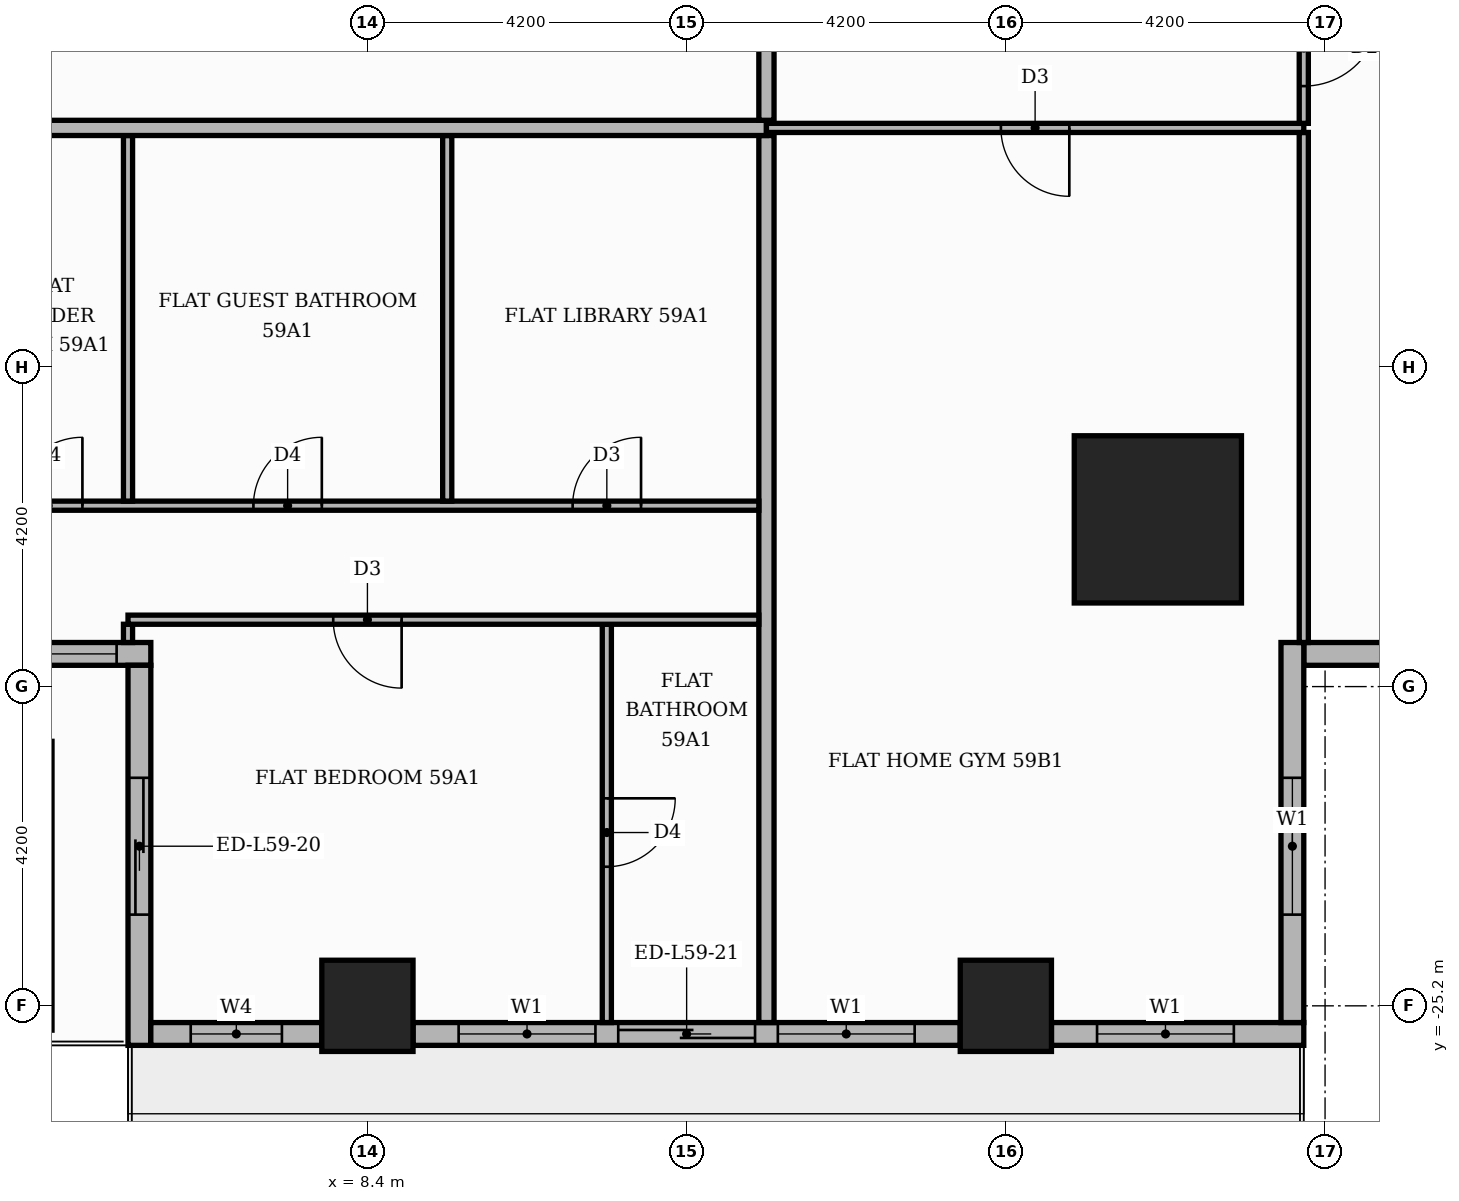
"""IFC4 building model, lengths in metres.
Left out: names, types, materials, properties, quantities, classifications, styles, units other than length and angle.
Written with IfcOpenShell. Run it as: python <this file> out.ifc"""

import sys

from ifc_helpers import new_model, si_unit, direction, frame, frame_2d, origin, origin_2d, place, context, subcontext, project, spatial, rectangle, extrude, element, fill, save


model = new_model("IFC4")
c1 = context("Model", 3, precision=1e-05, world=origin(), true_north=direction((0.0, 1.0)))
c2 = subcontext(c1, "Body", "Model", "MODEL_VIEW")
j1 = project(units=[si_unit("LENGTHUNIT", "METRE"), si_unit("PLANEANGLEUNIT", "RADIAN")], contexts=[c1])
p1 = place(None, origin())
s1 = spatial("IfcSite", under=j1, at=p1, CompositionType="ELEMENT")
p2 = place(p1, origin())
s2 = spatial("IfcBuilding", under=s1, at=p2, CompositionType="ELEMENT")
p3 = place(p2, frame((0.0, 0.0, 248.4)))
s3 = spatial("IfcBuildingStorey", under=s2, at=p3, CompositionType="ELEMENT", Elevation=248.4)
p4 = place(p3, frame((18.8, -18.8, 0.0), z_axis=(0.0, 0.0, 1.0), x_axis=(1.0, 0.0, 0.0)))
e1 = element("IfcColumn", 1, at=p4, inside=s3, PredefinedType="COLUMN", context=c2, shape_type="SweptSolid", body=[
    extrude(rectangle(XDim=2.2, YDim=2.2, at=origin_2d()), origin(), (0.0, 0.0, 1.0), 3.9),
])
for number, where, z_axis, x_axis in (
    (2, (8.4, -25.2, 0.0), (0.0, 0.0, 1.0), (1.0, 0.0, 0.0)),
    (3, (16.8, -25.2, 0.0), (0.0, 0.0, 1.0), (1.0, 0.0, 0.0)),
):
    element("IfcColumn", number, at=place(p3, frame(where, z_axis=z_axis, x_axis=x_axis)), inside=s3, PredefinedType="COLUMN", context=c2, shape_type="SweptSolid", body=[
        extrude(rectangle(XDim=1.2, YDim=1.2, at=origin_2d()), origin(), (0.0, 0.0, 1.0), 3.9),
    ])
p5 = place(p3, frame((20.72, -20.57, 0.0), z_axis=(0.0, 0.0, 1.0), x_axis=(1.0, 0.0, 0.0)))
e4 = element("IfcWall", 4, at=p5, inside=s3, PredefinedType="STANDARD", context=c2, shape_type="SweptSolid", body=[
    extrude(rectangle(XDim=5.0, YDim=0.3, at=frame_2d((2.5, 0.0))), origin(), (0.0, 0.0, 1.0), 3.48),
])
p6 = place(p5, frame((1.48, 0.0, 0.9)))
e5 = element("IfcOpeningElement", 5, at=p6, cuts=e4, PredefinedType="OPENING", context=c2, shape_type="SweptSolid", body=[
    extrude(rectangle(XDim=1.8, YDim=2.1, at=frame_2d((0.9, 1.05))), frame((0.0, 0.16, 0.0), z_axis=(0.0, -1.0, 0.0), x_axis=(1.0, 0.0, 0.0)), (0.0, 0.0, 1.0), 0.32),
])
p7 = place(p3, frame((-5.25, -20.57, 0.0), z_axis=(0.0, 0.0, 1.0), x_axis=(1.0, 0.0, 0.0)))
e6 = element("IfcWall", 6, at=p7, inside=s3, PredefinedType="STANDARD", context=c2, shape_type="SweptSolid", body=[
    extrude(rectangle(XDim=10.8, YDim=0.3, at=frame_2d((5.4, 0.0))), origin(), (0.0, 0.0, 1.0), 3.48),
])
p8 = place(p7, frame((0.15, 0.0, 0.9)))
e7 = element("IfcOpeningElement", 7, at=p8, cuts=e6, PredefinedType="OPENING", context=c2, shape_type="SweptSolid", body=[
    extrude(rectangle(XDim=6.0, YDim=2.1, at=frame_2d((3.0, 1.05))), frame((0.0, 0.16, 0.0), z_axis=(0.0, -1.0, 0.0), x_axis=(1.0, 0.0, 0.0)), (0.0, 0.0, 1.0), 0.32),
])
p9 = place(p7, frame((6.45, 0.0, 0.9)))
e8 = element("IfcOpeningElement", 8, at=p9, cuts=e6, PredefinedType="OPENING", context=c2, shape_type="SweptSolid", body=[
    extrude(rectangle(XDim=3.9, YDim=2.1, at=frame_2d((1.95, 1.05))), frame((0.0, 0.16, 0.0), z_axis=(0.0, -1.0, 0.0), x_axis=(1.0, 0.0, 0.0)), (0.0, 0.0, 1.0), 0.32),
])
p10 = place(p3, frame((5.4, -20.72, 0.0), z_axis=(0.0, 0.0, 1.0), x_axis=(0.0, -1.0, 0.0)))
e9 = element("IfcWall", 9, at=p10, inside=s3, PredefinedType="STANDARD", context=c2, shape_type="SweptSolid", body=[
    extrude(rectangle(XDim=5.0, YDim=0.3, at=frame_2d((2.5, 0.0))), origin(), (0.0, 0.0, 1.0), 3.48),
])
p11 = place(p10, frame((1.48, 0.0, 0.0)))
e10 = element("IfcOpeningElement", 10, at=p11, cuts=e9, PredefinedType="OPENING", context=c2, shape_type="SweptSolid", body=[
    extrude(rectangle(XDim=1.8, YDim=2.4, at=frame_2d((0.9, 1.2))), frame((0.0, 0.16, 0.0), z_axis=(0.0, -1.0, 0.0), x_axis=(1.0, 0.0, 0.0)), (0.0, 0.0, 1.0), 0.32),
])
p12 = place(p3, frame((5.55, -25.57, 0.0), z_axis=(0.0, 0.0, 1.0), x_axis=(1.0, 0.0, 0.0)))
e11 = element("IfcWall", 11, at=p12, inside=s3, PredefinedType="STANDARD", context=c2, shape_type="SweptSolid", body=[
    extrude(rectangle(XDim=2.25, YDim=0.3, at=frame_2d((1.125, 0.0))), origin(), (0.0, 0.0, 1.0), 3.48),
])
p13 = place(p12, frame((0.525, 0.0, 0.9)))
e12 = element("IfcOpeningElement", 12, at=p13, cuts=e11, PredefinedType="OPENING", context=c2, shape_type="SweptSolid", body=[
    extrude(rectangle(XDim=1.2, YDim=2.1, at=frame_2d((0.6, 1.05))), frame((0.0, 0.16, 0.0), z_axis=(0.0, -1.0, 0.0), x_axis=(1.0, 0.0, 0.0)), (0.0, 0.0, 1.0), 0.32),
])
p14 = place(p3, frame((9.0, -25.57, 0.0), z_axis=(0.0, 0.0, 1.0), x_axis=(1.0, 0.0, 0.0)))
e13 = element("IfcWall", 13, at=p14, inside=s3, PredefinedType="STANDARD", context=c2, shape_type="SweptSolid", body=[
    extrude(rectangle(XDim=7.2, YDim=0.3, at=frame_2d((3.6, 0.0))), origin(), (0.0, 0.0, 1.0), 3.48),
])
p15 = place(p14, frame((0.6, 0.0, 0.9)))
e14 = element("IfcOpeningElement", 14, at=p15, cuts=e13, PredefinedType="OPENING", context=c2, shape_type="SweptSolid", body=[
    extrude(rectangle(XDim=1.8, YDim=2.1, at=frame_2d((0.9, 1.05))), frame((0.0, 0.16, 0.0), z_axis=(0.0, -1.0, 0.0), x_axis=(1.0, 0.0, 0.0)), (0.0, 0.0, 1.0), 0.32),
])
p16 = place(p14, frame((2.7, 0.0, 0.0)))
e15 = element("IfcOpeningElement", 15, at=p16, cuts=e13, PredefinedType="OPENING", context=c2, shape_type="SweptSolid", body=[
    extrude(rectangle(XDim=1.8, YDim=2.4, at=frame_2d((0.9, 1.2))), frame((0.0, 0.16, 0.0), z_axis=(0.0, -1.0, 0.0), x_axis=(1.0, 0.0, 0.0)), (0.0, 0.0, 1.0), 0.32),
])
p17 = place(p14, frame((4.8, 0.0, 0.9)))
e16 = element("IfcOpeningElement", 16, at=p17, cuts=e13, PredefinedType="OPENING", context=c2, shape_type="SweptSolid", body=[
    extrude(rectangle(XDim=1.8, YDim=2.1, at=frame_2d((0.9, 1.05))), frame((0.0, 0.16, 0.0), z_axis=(0.0, -1.0, 0.0), x_axis=(1.0, 0.0, 0.0)), (0.0, 0.0, 1.0), 0.32),
])
p18 = place(p3, frame((17.4, -25.57, 0.0), z_axis=(0.0, 0.0, 1.0), x_axis=(1.0, 0.0, 0.0)))
e17 = element("IfcWall", 17, at=p18, inside=s3, PredefinedType="STANDARD", context=c2, shape_type="SweptSolid", body=[
    extrude(rectangle(XDim=3.32, YDim=0.3, at=frame_2d((1.66, 0.0))), origin(), (0.0, 0.0, 1.0), 3.48),
])
p19 = place(p18, frame((0.6, 0.0, 0.9)))
e18 = element("IfcOpeningElement", 18, at=p19, cuts=e17, PredefinedType="OPENING", context=c2, shape_type="SweptSolid", body=[
    extrude(rectangle(XDim=1.8, YDim=2.1, at=frame_2d((0.9, 1.05))), frame((0.0, 0.16, 0.0), z_axis=(0.0, -1.0, 0.0), x_axis=(1.0, 0.0, 0.0)), (0.0, 0.0, 1.0), 0.32),
])
p20 = place(p3, frame((20.57, -25.42, 0.0), z_axis=(0.0, 0.0, 1.0), x_axis=(0.0, 1.0, 0.0)))
e19 = element("IfcWall", 19, at=p20, inside=s3, PredefinedType="STANDARD", context=c2, shape_type="SweptSolid", body=[
    extrude(rectangle(XDim=5.0, YDim=0.3, at=frame_2d((2.5, 0.0))), origin(), (0.0, 0.0, 1.0), 3.48),
])
p21 = place(p20, frame((1.42, 0.0, 0.9)))
e20 = element("IfcOpeningElement", 20, at=p21, cuts=e19, PredefinedType="OPENING", context=c2, shape_type="SweptSolid", body=[
    extrude(rectangle(XDim=1.8, YDim=2.1, at=frame_2d((0.9, 1.05))), frame((0.0, 0.16, 0.0), z_axis=(0.0, -1.0, 0.0), x_axis=(1.0, 0.0, 0.0)), (0.0, 0.0, 1.0), 0.32),
])
p22 = place(p3, frame((11.55, -25.42, 0.0), z_axis=(0.0, 0.0, 1.0), x_axis=(0.0, 1.0, 0.0)))
e21 = element("IfcWall", 21, at=p22, inside=s3, PredefinedType="PARTITIONING", context=c2, shape_type="SweptSolid", body=[
    extrude(rectangle(XDim=5.24, YDim=0.12, at=frame_2d((2.62, 0.0))), origin(), (0.0, 0.0, 1.0), 3.48),
])
p23 = place(p22, frame((2.05, 0.0, 0.0)))
e22 = element("IfcOpeningElement", 22, at=p23, cuts=e21, PredefinedType="OPENING", context=c2, shape_type="SweptSolid", body=[
    extrude(rectangle(XDim=0.9, YDim=2.1, at=frame_2d((0.45, 1.05))), frame((0.0, 0.07, 0.0), z_axis=(0.0, -1.0, 0.0), x_axis=(1.0, 0.0, 0.0)), (0.0, 0.0, 1.0), 0.14),
])
p24 = place(p3, frame((13.65, -25.42, 0.0), z_axis=(0.0, 0.0, 1.0), x_axis=(0.0, 1.0, 0.0)))
e23 = element("IfcWall", 23, at=p24, inside=s3, PredefinedType="PARTITIONING", context=c2, shape_type="SweptSolid", body=[
    extrude(rectangle(XDim=11.67, YDim=0.2, at=frame_2d((5.835, 0.0))), origin(), (0.0, 0.0, 1.0), 3.48),
])
p25 = place(p3, frame((5.25, -20.42, 0.0), z_axis=(0.0, 0.0, 1.0), x_axis=(0.0, 1.0, 0.0)))
e24 = element("IfcWall", 24, at=p25, inside=s3, PredefinedType="PARTITIONING", context=c2, shape_type="SweptSolid", body=[
    extrude(rectangle(XDim=0.24, YDim=0.12, at=frame_2d((0.12, 0.0))), origin(), (0.0, 0.0, 1.0), 3.48),
])
p26 = place(p3, frame((20.72, -20.42, 0.0), z_axis=(0.0, 0.0, 1.0), x_axis=(0.0, 1.0, 0.0)))
e25 = element("IfcWall", 25, at=p26, inside=s3, PredefinedType="PARTITIONING", context=c2, shape_type="SweptSolid", body=[
    extrude(rectangle(XDim=6.71, YDim=0.12, at=frame_2d((3.355, 0.0))), origin(), (0.0, 0.0, 1.0), 3.48),
])
p27 = place(p3, frame((5.25, -20.12, 0.0), z_axis=(0.0, 0.0, 1.0), x_axis=(1.0, 0.0, 0.0)))
e26 = element("IfcWall", 26, at=p27, inside=s3, PredefinedType="PARTITIONING", context=c2, shape_type="SweptSolid", body=[
    extrude(rectangle(XDim=8.3, YDim=0.12, at=frame_2d((4.15, 0.0))), origin(), (0.0, 0.0, 1.0), 3.48),
])
p28 = place(p27, frame((2.7, 0.0, 0.0)))
e27 = element("IfcOpeningElement", 27, at=p28, cuts=e26, PredefinedType="OPENING", context=c2, shape_type="SweptSolid", body=[
    extrude(rectangle(XDim=0.9, YDim=2.1, at=frame_2d((0.45, 1.05))), frame((0.0, 0.07, 0.0), z_axis=(0.0, -1.0, 0.0), x_axis=(1.0, 0.0, 0.0)), (0.0, 0.0, 1.0), 0.14),
])
p29 = place(p3, frame((-9.45, -18.62, 0.0), z_axis=(0.0, 0.0, 1.0), x_axis=(1.0, 0.0, 0.0)))
e28 = element("IfcWall", 28, at=p29, inside=s3, PredefinedType="PARTITIONING", context=c2, shape_type="SweptSolid", body=[
    extrude(rectangle(XDim=23.0, YDim=0.12, at=frame_2d((11.5, 0.0))), origin(), (0.0, 0.0, 1.0), 3.48),
])
p30 = place(p29, frame((2.7, 0.0, 0.0)))
e29 = element("IfcOpeningElement", 29, at=p30, cuts=e28, PredefinedType="OPENING", context=c2, shape_type="SweptSolid", body=[
    extrude(rectangle(XDim=0.9, YDim=2.1, at=frame_2d((0.45, 1.05))), frame((0.0, 0.07, 0.0), z_axis=(0.0, -1.0, 0.0), x_axis=(1.0, 0.0, 0.0)), (0.0, 0.0, 1.0), 0.14),
])
p31 = place(p29, frame((9.0, 0.0, 0.0)))
e30 = element("IfcOpeningElement", 30, at=p31, cuts=e28, PredefinedType="OPENING", context=c2, shape_type="SweptSolid", body=[
    extrude(rectangle(XDim=0.9, YDim=2.1, at=frame_2d((0.45, 1.05))), frame((0.0, 0.07, 0.0), z_axis=(0.0, -1.0, 0.0), x_axis=(1.0, 0.0, 0.0)), (0.0, 0.0, 1.0), 0.14),
])
p32 = place(p29, frame((13.2, 0.0, 0.0)))
e31 = element("IfcOpeningElement", 31, at=p32, cuts=e28, PredefinedType="OPENING", context=c2, shape_type="SweptSolid", body=[
    extrude(rectangle(XDim=0.9, YDim=2.1, at=frame_2d((0.45, 1.05))), frame((0.0, 0.07, 0.0), z_axis=(0.0, -1.0, 0.0), x_axis=(1.0, 0.0, 0.0)), (0.0, 0.0, 1.0), 0.14),
])
p33 = place(p29, frame((16.35, 0.0, 0.0)))
e32 = element("IfcOpeningElement", 32, at=p33, cuts=e28, PredefinedType="OPENING", context=c2, shape_type="SweptSolid", body=[
    extrude(rectangle(XDim=0.9, YDim=2.1, at=frame_2d((0.45, 1.05))), frame((0.0, 0.07, 0.0), z_axis=(0.0, -1.0, 0.0), x_axis=(1.0, 0.0, 0.0)), (0.0, 0.0, 1.0), 0.14),
])
p34 = place(p29, frame((20.55, 0.0, 0.0)))
e33 = element("IfcOpeningElement", 33, at=p34, cuts=e28, PredefinedType="OPENING", context=c2, shape_type="SweptSolid", body=[
    extrude(rectangle(XDim=0.9, YDim=2.1, at=frame_2d((0.45, 1.05))), frame((0.0, 0.07, 0.0), z_axis=(0.0, -1.0, 0.0), x_axis=(1.0, 0.0, 0.0)), (0.0, 0.0, 1.0), 0.14),
])
for number, where, z_axis, x_axis in (
    (34, (5.25, -18.56, 0.0), (0.0, 0.0, 1.0), (0.0, 1.0, 0.0)),
    (35, (9.45, -18.56, 0.0), (0.0, 0.0, 1.0), (0.0, 1.0, 0.0)),
):
    element("IfcWall", number, at=place(p3, frame(where, z_axis=z_axis, x_axis=x_axis)), inside=s3, PredefinedType="PARTITIONING", context=c2, shape_type="SweptSolid", body=[
        extrude(rectangle(XDim=4.81, YDim=0.12, at=frame_2d((2.405, 0.0))), origin(), (0.0, 0.0, 1.0), 3.48),
    ])
p35 = place(p3, frame((-25.42, -13.65, 0.0), z_axis=(0.0, 0.0, 1.0), x_axis=(1.0, 0.0, 0.0)))
e36 = element("IfcWall", 36, at=p35, inside=s3, PredefinedType="PARTITIONING", context=c2, shape_type="SweptSolid", body=[
    extrude(rectangle(XDim=39.07, YDim=0.2, at=frame_2d((19.535, 0.0))), origin(), (0.0, 0.0, 1.0), 3.48),
])
p36 = place(p35, frame((13.32, 0.0, 0.0)))
e37 = element("IfcOpeningElement", 37, at=p36, cuts=e36, PredefinedType="OPENING", context=c2, shape_type="SweptSolid", body=[
    extrude(rectangle(XDim=1.1, YDim=2.4, at=frame_2d((0.55, 1.2))), frame((0.0, 0.11, 0.0), z_axis=(0.0, -1.0, 0.0), x_axis=(1.0, 0.0, 0.0)), (0.0, 0.0, 1.0), 0.22),
])
p37 = place(p3, frame((13.65, -13.65, 0.0), z_axis=(0.0, 0.0, 1.0), x_axis=(1.0, 0.0, 0.0)))
e38 = element("IfcWall", 38, at=p37, inside=s3, PredefinedType="PARTITIONING", context=c2, shape_type="SweptSolid", body=[
    extrude(rectangle(XDim=7.07, YDim=0.12, at=frame_2d((3.535, 0.0))), origin(), (0.0, 0.0, 1.0), 3.48),
])
p38 = place(p37, frame((3.085, 0.0, 0.0)))
e39 = element("IfcOpeningElement", 39, at=p38, cuts=e38, PredefinedType="OPENING", context=c2, shape_type="SweptSolid", body=[
    extrude(rectangle(XDim=0.9, YDim=2.1, at=frame_2d((0.45, 1.05))), frame((0.0, 0.07, 0.0), z_axis=(0.0, -1.0, 0.0), x_axis=(1.0, 0.0, 0.0)), (0.0, 0.0, 1.0), 0.14),
])
p39 = place(p3, frame((20.72, -13.59, 0.0), z_axis=(0.0, 0.0, 1.0), x_axis=(0.0, 1.0, 0.0)))
e40 = element("IfcWall", 40, at=p39, inside=s3, PredefinedType="PARTITIONING", context=c2, shape_type="SweptSolid", body=[
    extrude(rectangle(XDim=1.98, YDim=0.12, at=frame_2d((0.99, 0.0))), origin(), (0.0, 0.0, 1.0), 3.48),
])
p40 = place(p39, frame((0.49, 0.0, 0.0)))
e41 = element("IfcOpeningElement", 41, at=p40, cuts=e40, PredefinedType="OPENING", context=c2, shape_type="SweptSolid", body=[
    extrude(rectangle(XDim=1.0, YDim=2.1, at=frame_2d((0.5, 1.05))), frame((0.0, 0.07, 0.0), z_axis=(0.0, -1.0, 0.0), x_axis=(1.0, 0.0, 0.0)), (0.0, 0.0, 1.0), 0.14),
])
p41 = place(p3, frame((13.65, -13.55, 0.0), z_axis=(0.0, 0.0, 1.0), x_axis=(0.0, 1.0, 0.0)))
e42 = element("IfcWall", 42, at=p41, inside=s3, PredefinedType="PARTITIONING", context=c2, shape_type="SweptSolid", body=[
    extrude(rectangle(XDim=2.45, YDim=0.2, at=frame_2d((1.225, 0.0))), origin(), (0.0, 0.0, 1.0), 3.48),
])
p42 = place(p9, origin())
e43 = element("IfcWindow", 43, at=p42, inside=s3, PartitioningType="SINGLE_PANEL", PredefinedType="WINDOW", context=c2, shape_type="SweptSolid", body=[
    extrude(rectangle(XDim=3.9, YDim=2.1, at=frame_2d((1.95, 1.05))), frame((0.0, 0.03, 0.0), z_axis=(0.0, -1.0, 0.0), x_axis=(1.0, 0.0, 0.0)), (0.0, 0.0, 1.0), 0.06),
])
fill(e8, e43)
p43 = place(p11, origin())
e44 = element("IfcDoor", 44, at=p43, inside=s3, OperationType="SLIDING_TO_RIGHT", PredefinedType="DOOR", context=c2, shape_type="SweptSolid", body=[
    extrude(rectangle(XDim=1.8, YDim=2.4, at=frame_2d((0.9, 1.2))), frame((0.0, 0.025, 0.0), z_axis=(0.0, -1.0, 0.0), x_axis=(1.0, 0.0, 0.0)), (0.0, 0.0, 1.0), 0.05),
])
fill(e10, e44)
p44 = place(p13, origin())
e45 = element("IfcWindow", 45, at=p44, inside=s3, PartitioningType="SINGLE_PANEL", PredefinedType="WINDOW", context=c2, shape_type="SweptSolid", body=[
    extrude(rectangle(XDim=1.2, YDim=2.1, at=frame_2d((0.6, 1.05))), frame((0.0, 0.03, 0.0), z_axis=(0.0, -1.0, 0.0), x_axis=(1.0, 0.0, 0.0)), (0.0, 0.0, 1.0), 0.06),
])
fill(e12, e45)
p45 = place(p15, origin())
e46 = element("IfcWindow", 46, at=p45, inside=s3, PartitioningType="SINGLE_PANEL", PredefinedType="WINDOW", context=c2, shape_type="SweptSolid", body=[
    extrude(rectangle(XDim=1.8, YDim=2.1, at=frame_2d((0.9, 1.05))), frame((0.0, 0.03, 0.0), z_axis=(0.0, -1.0, 0.0), x_axis=(1.0, 0.0, 0.0)), (0.0, 0.0, 1.0), 0.06),
])
fill(e14, e46)
p46 = place(p16, origin())
e47 = element("IfcDoor", 47, at=p46, inside=s3, OperationType="SLIDING_TO_RIGHT", PredefinedType="DOOR", context=c2, shape_type="SweptSolid", body=[
    extrude(rectangle(XDim=1.8, YDim=2.4, at=frame_2d((0.9, 1.2))), frame((0.0, 0.025, 0.0), z_axis=(0.0, -1.0, 0.0), x_axis=(1.0, 0.0, 0.0)), (0.0, 0.0, 1.0), 0.05),
])
fill(e15, e47)
p47 = place(p17, origin())
e48 = element("IfcWindow", 48, at=p47, inside=s3, PartitioningType="SINGLE_PANEL", PredefinedType="WINDOW", context=c2, shape_type="SweptSolid", body=[
    extrude(rectangle(XDim=1.8, YDim=2.1, at=frame_2d((0.9, 1.05))), frame((0.0, 0.03, 0.0), z_axis=(0.0, -1.0, 0.0), x_axis=(1.0, 0.0, 0.0)), (0.0, 0.0, 1.0), 0.06),
])
fill(e16, e48)
p48 = place(p19, origin())
e49 = element("IfcWindow", 49, at=p48, inside=s3, PartitioningType="SINGLE_PANEL", PredefinedType="WINDOW", context=c2, shape_type="SweptSolid", body=[
    extrude(rectangle(XDim=1.8, YDim=2.1, at=frame_2d((0.9, 1.05))), frame((0.0, 0.03, 0.0), z_axis=(0.0, -1.0, 0.0), x_axis=(1.0, 0.0, 0.0)), (0.0, 0.0, 1.0), 0.06),
])
fill(e18, e49)
p49 = place(p21, origin())
e50 = element("IfcWindow", 50, at=p49, inside=s3, PartitioningType="SINGLE_PANEL", PredefinedType="WINDOW", context=c2, shape_type="SweptSolid", body=[
    extrude(rectangle(XDim=1.8, YDim=2.1, at=frame_2d((0.9, 1.05))), frame((0.0, 0.03, 0.0), z_axis=(0.0, -1.0, 0.0), x_axis=(1.0, 0.0, 0.0)), (0.0, 0.0, 1.0), 0.06),
])
fill(e20, e50)
p50 = place(p32, origin())
e51 = element("IfcDoor", 51, at=p50, inside=s3, OperationType="SINGLE_SWING_RIGHT", PredefinedType="DOOR", context=c2, shape_type="SweptSolid", body=[
    extrude(rectangle(XDim=0.9, YDim=2.1, at=frame_2d((0.45, 1.05))), frame((0.0, 0.025, 0.0), z_axis=(0.0, -1.0, 0.0), x_axis=(1.0, 0.0, 0.0)), (0.0, 0.0, 1.0), 0.05),
])
fill(e31, e51)
p51 = place(p33, origin())
e52 = element("IfcDoor", 52, at=p51, inside=s3, OperationType="SINGLE_SWING_RIGHT", PredefinedType="DOOR", context=c2, shape_type="SweptSolid", body=[
    extrude(rectangle(XDim=0.9, YDim=2.1, at=frame_2d((0.45, 1.05))), frame((0.0, 0.025, 0.0), z_axis=(0.0, -1.0, 0.0), x_axis=(1.0, 0.0, 0.0)), (0.0, 0.0, 1.0), 0.05),
])
fill(e32, e52)
p52 = place(p34, origin())
e53 = element("IfcDoor", 53, at=p52, inside=s3, OperationType="SINGLE_SWING_RIGHT", PredefinedType="DOOR", context=c2, shape_type="SweptSolid", body=[
    extrude(rectangle(XDim=0.9, YDim=2.1, at=frame_2d((0.45, 1.05))), frame((0.0, 0.025, 0.0), z_axis=(0.0, -1.0, 0.0), x_axis=(1.0, 0.0, 0.0)), (0.0, 0.0, 1.0), 0.05),
])
fill(e33, e53)
p53 = place(p28, frame((0.9, 0.0, 0.0), z_axis=(0.0, 0.0, 1.0), x_axis=(-1.0, 0.0, 0.0)))
e54 = element("IfcDoor", 54, at=p53, inside=s3, OperationType="SINGLE_SWING_RIGHT", PredefinedType="DOOR", context=c2, shape_type="SweptSolid", body=[
    extrude(rectangle(XDim=0.9, YDim=2.1, at=frame_2d((0.45, 1.05))), frame((0.0, 0.025, 0.0), z_axis=(0.0, -1.0, 0.0), x_axis=(1.0, 0.0, 0.0)), (0.0, 0.0, 1.0), 0.05),
])
fill(e27, e54)
p54 = place(p23, frame((0.9, 0.0, 0.0), z_axis=(0.0, 0.0, 1.0), x_axis=(-1.0, 0.0, 0.0)))
e55 = element("IfcDoor", 55, at=p54, inside=s3, OperationType="SINGLE_SWING_RIGHT", PredefinedType="DOOR", context=c2, shape_type="SweptSolid", body=[
    extrude(rectangle(XDim=0.9, YDim=2.1, at=frame_2d((0.45, 1.05))), frame((0.0, 0.025, 0.0), z_axis=(0.0, -1.0, 0.0), x_axis=(1.0, 0.0, 0.0)), (0.0, 0.0, 1.0), 0.05),
])
fill(e22, e55)
p55 = place(p38, frame((0.9, 0.0, 0.0), z_axis=(0.0, 0.0, 1.0), x_axis=(-1.0, 0.0, 0.0)))
e56 = element("IfcDoor", 56, at=p55, inside=s3, OperationType="SINGLE_SWING_RIGHT", PredefinedType="DOOR", context=c2, shape_type="SweptSolid", body=[
    extrude(rectangle(XDim=0.9, YDim=2.1, at=frame_2d((0.45, 1.05))), frame((0.0, 0.025, 0.0), z_axis=(0.0, -1.0, 0.0), x_axis=(1.0, 0.0, 0.0)), (0.0, 0.0, 1.0), 0.05),
])
fill(e39, e56)
p56 = place(p40, frame((1.0, 0.0, 0.0), z_axis=(0.0, 0.0, 1.0), x_axis=(-1.0, 0.0, 0.0)))
e57 = element("IfcDoor", 57, at=p56, inside=s3, OperationType="SINGLE_SWING_RIGHT", PredefinedType="DOOR", context=c2, shape_type="SweptSolid", body=[
    extrude(rectangle(XDim=1.0, YDim=2.1, at=frame_2d((0.5, 1.05))), frame((0.0, 0.025, 0.0), z_axis=(0.0, -1.0, 0.0), x_axis=(1.0, 0.0, 0.0)), (0.0, 0.0, 1.0), 0.05),
])
fill(e41, e57)
save(model, sys.argv[1])
